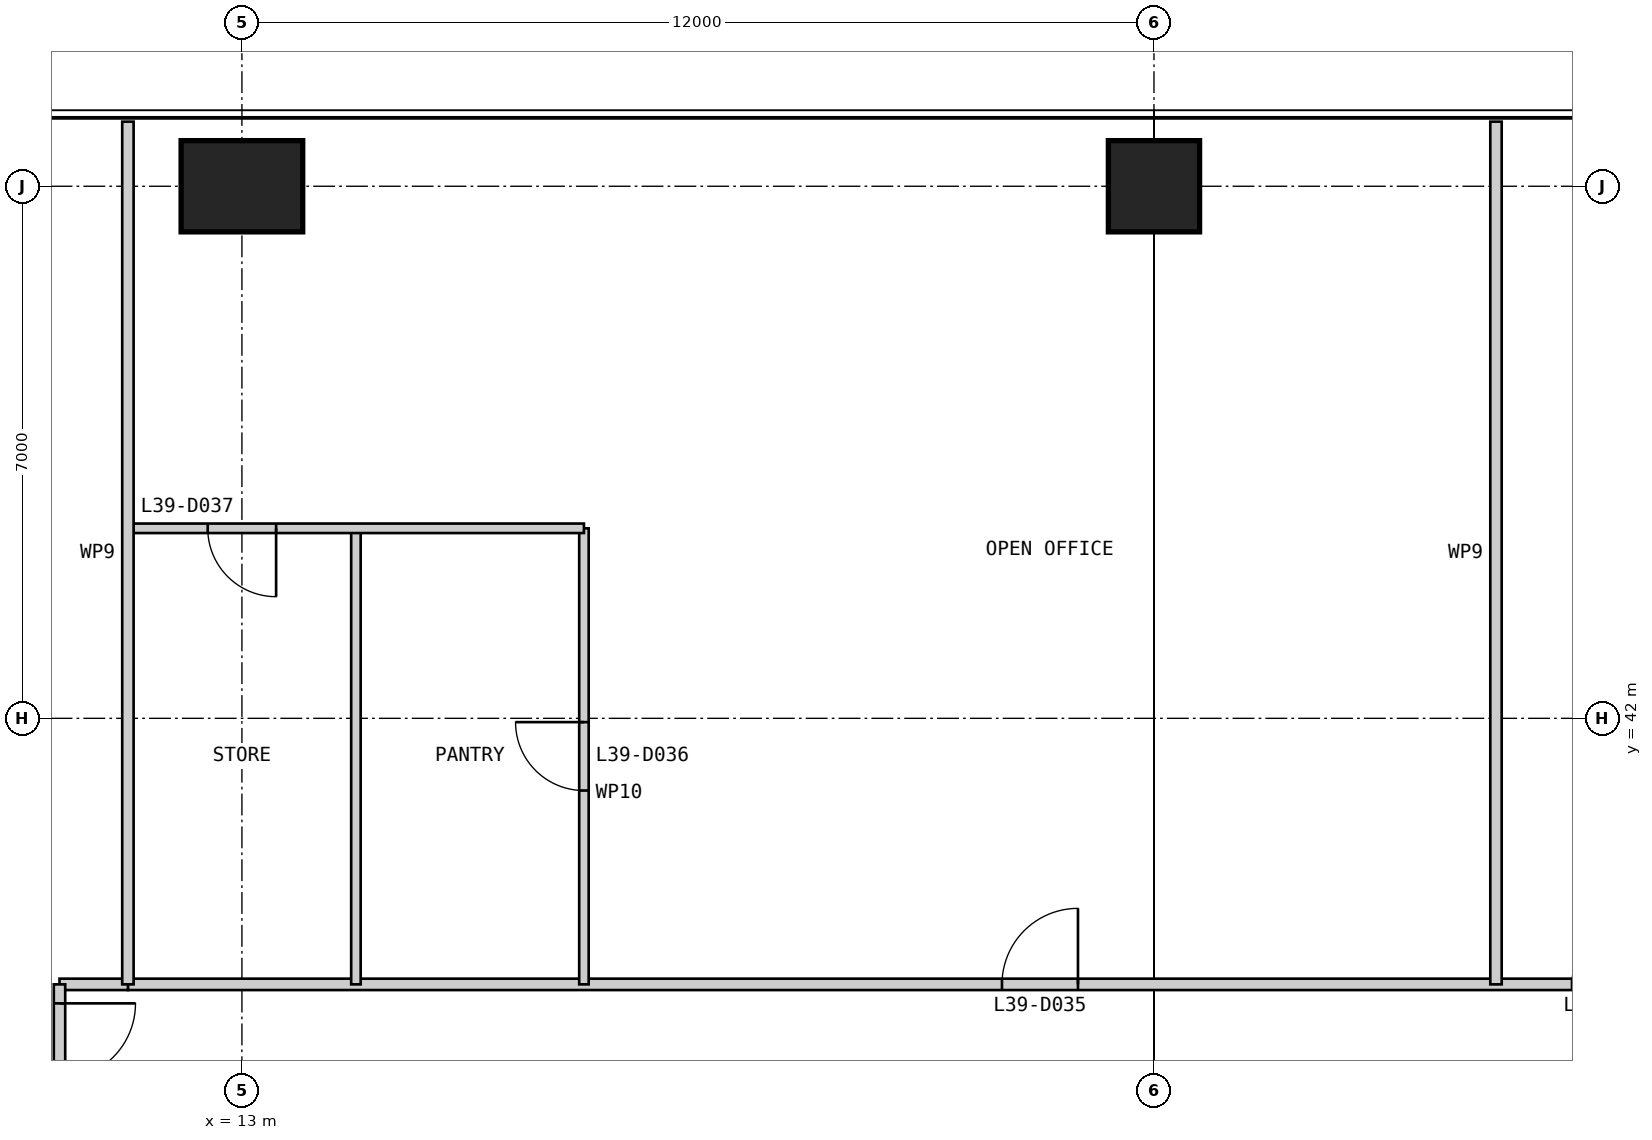
"""IFC4 building model, lengths in metres.
Left out: names, types, materials, properties, quantities, classifications, styles, units other than length and angle.
Written with IfcOpenShell. Run it as: python <this file> out.ifc"""

import sys

from ifc_helpers import new_model, si_unit, direction, frame, frame_2d, origin, origin_2d, place, context, subcontext, project, spatial, rectangle, extrude, element, fill, save


model = new_model("IFC4")
c1 = context("Model", 3, precision=1e-05, world=origin(), true_north=direction((0.0, 1.0)))
c2 = subcontext(c1, "Body", "Model", "MODEL_VIEW")
j1 = project(units=[si_unit("LENGTHUNIT", "METRE"), si_unit("PLANEANGLEUNIT", "RADIAN")], contexts=[c1])
p1 = place(None, origin())
s1 = spatial("IfcSite", under=j1, at=p1, CompositionType="ELEMENT")
p2 = place(p1, origin())
s2 = spatial("IfcBuilding", under=s1, at=p2, CompositionType="ELEMENT")
p3 = place(p2, frame((0.0, 0.0, 168.4)))
s3 = spatial("IfcBuildingStorey", under=s2, at=p3, CompositionType="ELEMENT", Elevation=168.4)
p4 = place(p3, frame((25.0, 49.0, 0.0), z_axis=(0.0, 0.0, 1.0), x_axis=(1.0, 0.0, 0.0)))
e1 = element("IfcColumn", 1, at=p4, inside=s3, PredefinedType="COLUMN", context=c2, shape_type="SweptSolid", body=[
    extrude(rectangle(XDim=1.2, YDim=1.2, at=origin_2d()), origin(), (0.0, 0.0, 1.0), 5.4),
])
p5 = place(p3, frame((13.0, 49.0, 0.0), z_axis=(0.0, 0.0, 1.0), x_axis=(1.0, 0.0, 0.0)))
e2 = element("IfcColumn", 2, at=p5, inside=s3, PredefinedType="COLUMN", context=c2, shape_type="SweptSolid", body=[
    extrude(rectangle(XDim=1.6, YDim=1.2, at=origin_2d()), origin(), (0.0, 0.0, 1.0), 5.4),
])
p6 = place(p3, frame((38.5, 38.5, 0.0), z_axis=(0.0, 0.0, 1.0), x_axis=(-1.0, 0.0, 0.0)))
e3 = element("IfcWall", 3, at=p6, inside=s3, PredefinedType="PARTITIONING", context=c2, shape_type="SweptSolid", body=[
    extrude(rectangle(XDim=27.0, YDim=0.15, at=frame_2d((13.5, 0.0))), origin(), (0.0, 0.0, 1.0), 5.25),
])
p7 = place(p6, frame((2.5, 0.0, 0.0)))
e4 = element("IfcOpeningElement", 4, at=p7, cuts=e3, PredefinedType="OPENING", context=c2, shape_type="SweptSolid", body=[
    extrude(rectangle(XDim=1.0, YDim=2.2, at=frame_2d((0.5, 1.1))), frame((0.0, 0.085, 0.0), z_axis=(0.0, -1.0, 0.0), x_axis=(1.0, 0.0, 0.0)), (0.0, 0.0, 1.0), 0.17),
])
p8 = place(p6, frame((7.0, 0.0, 0.0)))
e5 = element("IfcOpeningElement", 5, at=p8, cuts=e3, PredefinedType="OPENING", context=c2, shape_type="SweptSolid", body=[
    extrude(rectangle(XDim=1.0, YDim=2.2, at=frame_2d((0.5, 1.1))), frame((0.0, 0.085, 0.0), z_axis=(0.0, -1.0, 0.0), x_axis=(1.0, 0.0, 0.0)), (0.0, 0.0, 1.0), 0.17),
])
p9 = place(p6, frame((14.5, 0.0, 0.0)))
e6 = element("IfcOpeningElement", 6, at=p9, cuts=e3, PredefinedType="OPENING", context=c2, shape_type="SweptSolid", body=[
    extrude(rectangle(XDim=1.0, YDim=2.2, at=frame_2d((0.5, 1.1))), frame((0.0, 0.085, 0.0), z_axis=(0.0, -1.0, 0.0), x_axis=(1.0, 0.0, 0.0)), (0.0, 0.0, 1.0), 0.17),
])
p10 = place(p3, frame((29.5, 49.85, 0.0), z_axis=(0.0, 0.0, 1.0), x_axis=(0.0, -1.0, 0.0)))
e7 = element("IfcWall", 7, at=p10, inside=s3, PredefinedType="PARTITIONING", context=c2, shape_type="SweptSolid", body=[
    extrude(rectangle(XDim=11.35, YDim=0.15, at=frame_2d((5.675, 0.0))), origin(), (0.0, 0.0, 1.0), 5.25),
])
p11 = place(p3, frame((17.5, 44.5, 0.0), z_axis=(0.0, 0.0, 1.0), x_axis=(0.0, -1.0, 0.0)))
e8 = element("IfcWall", 8, at=p11, inside=s3, PredefinedType="PARTITIONING", context=c2, shape_type="SweptSolid", body=[
    extrude(rectangle(XDim=6.0, YDim=0.125, at=frame_2d((3.0, 0.0))), origin(), (0.0, 0.0, 1.0), 5.25),
])
p12 = place(p11, frame((2.55, 0.0, 0.0)))
e9 = element("IfcOpeningElement", 9, at=p12, cuts=e8, PredefinedType="OPENING", context=c2, shape_type="SweptSolid", body=[
    extrude(rectangle(XDim=0.9, YDim=2.2, at=frame_2d((0.45, 1.1))), frame((0.0, 0.073, 0.0), z_axis=(0.0, -1.0, 0.0), x_axis=(1.0, 0.0, 0.0)), (0.0, 0.0, 1.0), 0.145),
])
p13 = place(p3, frame((14.5, 44.5, 0.0), z_axis=(0.0, 0.0, 1.0), x_axis=(0.0, -1.0, 0.0)))
e10 = element("IfcWall", 10, at=p13, inside=s3, PredefinedType="PARTITIONING", context=c2, shape_type="SweptSolid", body=[
    extrude(rectangle(XDim=6.0, YDim=0.125, at=frame_2d((3.0, 0.0))), origin(), (0.0, 0.0, 1.0), 5.25),
])
p14 = place(p3, frame((17.5, 44.5, 0.0), z_axis=(0.0, 0.0, 1.0), x_axis=(-1.0, 0.0, 0.0)))
e11 = element("IfcWall", 11, at=p14, inside=s3, PredefinedType="PARTITIONING", context=c2, shape_type="SweptSolid", body=[
    extrude(rectangle(XDim=6.0, YDim=0.125, at=frame_2d((3.0, 0.0))), origin(), (0.0, 0.0, 1.0), 5.25),
])
p15 = place(p14, frame((4.05, 0.0, 0.0)))
e12 = element("IfcOpeningElement", 12, at=p15, cuts=e11, PredefinedType="OPENING", context=c2, shape_type="SweptSolid", body=[
    extrude(rectangle(XDim=0.9, YDim=2.2, at=frame_2d((0.45, 1.1))), frame((0.0, 0.073, 0.0), z_axis=(0.0, -1.0, 0.0), x_axis=(1.0, 0.0, 0.0)), (0.0, 0.0, 1.0), 0.145),
])
p16 = place(p3, frame((11.5, 38.5, 0.0), z_axis=(0.0, 0.0, 1.0), x_axis=(-1.0, 0.0, 0.0)))
e13 = element("IfcWall", 13, at=p16, inside=s3, PredefinedType="PARTITIONING", context=c2, shape_type="SweptSolid", body=[
    extrude(rectangle(XDim=0.9, YDim=0.15, at=frame_2d((0.45, 0.0))), origin(), (0.0, 0.0, 1.0), 5.25),
])
p17 = place(p3, frame((10.6, 38.5, 0.0), z_axis=(0.0, 0.0, 1.0), x_axis=(0.0, -1.0, 0.0)))
e14 = element("IfcWall", 14, at=p17, inside=s3, PredefinedType="PARTITIONING", context=c2, shape_type="SweptSolid", body=[
    extrude(rectangle(XDim=27.9, YDim=0.15, at=frame_2d((13.95, 0.0))), origin(), (0.0, 0.0, 1.0), 5.25),
])
p18 = place(p17, frame((0.25, 0.0, 0.0)))
e15 = element("IfcOpeningElement", 15, at=p18, cuts=e14, PredefinedType="OPENING", context=c2, shape_type="SweptSolid", body=[
    extrude(rectangle(XDim=1.0, YDim=2.2, at=frame_2d((0.5, 1.1))), frame((0.0, 0.085, 0.0), z_axis=(0.0, -1.0, 0.0), x_axis=(1.0, 0.0, 0.0)), (0.0, 0.0, 1.0), 0.17),
])
p19 = place(p17, frame((16.75, 0.0, 0.0)))
e16 = element("IfcOpeningElement", 16, at=p19, cuts=e14, PredefinedType="OPENING", context=c2, shape_type="SweptSolid", body=[
    extrude(rectangle(XDim=1.0, YDim=2.2, at=frame_2d((0.5, 1.1))), frame((0.0, 0.085, 0.0), z_axis=(0.0, -1.0, 0.0), x_axis=(1.0, 0.0, 0.0)), (0.0, 0.0, 1.0), 0.17),
])
p20 = place(p17, frame((23.5, 0.0, 0.0)))
e17 = element("IfcOpeningElement", 17, at=p20, cuts=e14, PredefinedType="OPENING", context=c2, shape_type="SweptSolid", body=[
    extrude(rectangle(XDim=1.0, YDim=2.2, at=frame_2d((0.5, 1.1))), frame((0.0, 0.085, 0.0), z_axis=(0.0, -1.0, 0.0), x_axis=(1.0, 0.0, 0.0)), (0.0, 0.0, 1.0), 0.17),
])
p21 = place(p3, frame((11.5, 49.85, 0.0), z_axis=(0.0, 0.0, 1.0), x_axis=(0.0, -1.0, 0.0)))
e18 = element("IfcWall", 18, at=p21, inside=s3, PredefinedType="PARTITIONING", context=c2, shape_type="SweptSolid", body=[
    extrude(rectangle(XDim=11.35, YDim=0.15, at=frame_2d((5.675, 0.0))), origin(), (0.0, 0.0, 1.0), 5.25),
])
p22 = place(p9, frame((1.0, 0.0, 0.0), z_axis=(0.0, 0.0, 1.0), x_axis=(-1.0, 0.0, 0.0)))
e19 = element("IfcDoor", 19, at=p22, inside=s3, OperationType="SINGLE_SWING_RIGHT", PredefinedType="DOOR", context=c2, shape_type="SweptSolid", body=[
    extrude(rectangle(XDim=1.0, YDim=2.2, at=frame_2d((0.5, 1.1))), frame((0.0, 0.025, 0.0), z_axis=(0.0, -1.0, 0.0), x_axis=(1.0, 0.0, 0.0)), (0.0, 0.0, 1.0), 0.05),
])
fill(e6, e19)
p23 = place(p12, frame((0.9, 0.0, 0.0), z_axis=(0.0, 0.0, 1.0), x_axis=(-1.0, 0.0, 0.0)))
e20 = element("IfcDoor", 20, at=p23, inside=s3, OperationType="SINGLE_SWING_RIGHT", PredefinedType="DOOR", context=c2, shape_type="SweptSolid", body=[
    extrude(rectangle(XDim=0.9, YDim=2.2, at=frame_2d((0.45, 1.1))), frame((0.0, 0.025, 0.0), z_axis=(0.0, -1.0, 0.0), x_axis=(1.0, 0.0, 0.0)), (0.0, 0.0, 1.0), 0.05),
])
fill(e9, e20)
p24 = place(p15, origin())
e21 = element("IfcDoor", 21, at=p24, inside=s3, OperationType="SINGLE_SWING_LEFT", PredefinedType="DOOR", context=c2, shape_type="SweptSolid", body=[
    extrude(rectangle(XDim=0.9, YDim=2.2, at=frame_2d((0.45, 1.1))), frame((0.0, 0.025, 0.0), z_axis=(0.0, -1.0, 0.0), x_axis=(1.0, 0.0, 0.0)), (0.0, 0.0, 1.0), 0.05),
])
fill(e12, e21)
p25 = place(p18, origin())
e22 = element("IfcDoor", 22, at=p25, inside=s3, OperationType="SINGLE_SWING_LEFT", PredefinedType="DOOR", context=c2, shape_type="SweptSolid", body=[
    extrude(rectangle(XDim=1.0, YDim=2.2, at=frame_2d((0.5, 1.1))), frame((0.0, 0.025, 0.0), z_axis=(0.0, -1.0, 0.0), x_axis=(1.0, 0.0, 0.0)), (0.0, 0.0, 1.0), 0.05),
])
fill(e15, e22)
save(model, sys.argv[1])
